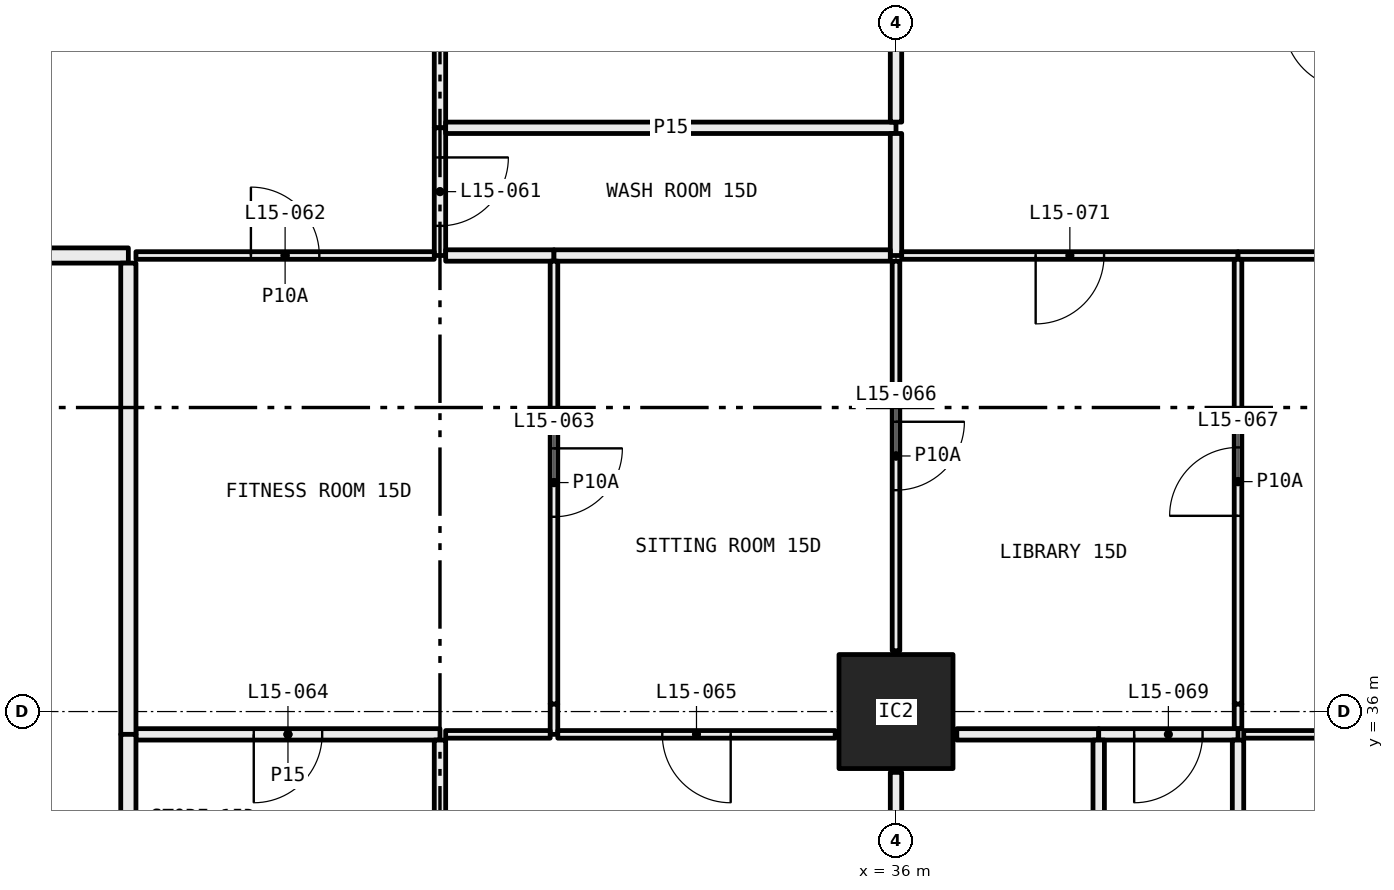
"""IFC4 building model, lengths in metres.
Left out: names, types, materials, properties, quantities, classifications, styles, units other than length and angle.
Written with IfcOpenShell. Run it as: python <this file> out.ifc"""

import sys

from ifc_helpers import new_model, si_unit, direction, frame, frame_2d, origin, origin_2d, place, context, subcontext, project, spatial, rectangle, hollow_rectangle, extrude, element, fill, save


model = new_model("IFC4")
c1 = context("Model", 3, precision=1e-05, world=origin(), true_north=direction((0.0, 1.0)))
c2 = subcontext(c1, "Body", "Model", "MODEL_VIEW")
j1 = project(units=[si_unit("LENGTHUNIT", "METRE"), si_unit("PLANEANGLEUNIT", "RADIAN")], contexts=[c1])
p1 = place(None, origin())
s1 = spatial("IfcSite", under=j1, at=p1, CompositionType="ELEMENT")
p2 = place(p1, origin())
s2 = spatial("IfcBuilding", under=s1, at=p2, CompositionType="ELEMENT")
p3 = place(p2, frame((0.0, 0.0, 64.5)))
s3 = spatial("IfcBuildingStorey", under=s2, at=p3, CompositionType="ELEMENT", Elevation=64.5)
p4 = place(p3, frame((36.0, 36.0, 0.0), z_axis=(0.0, 0.0, 1.0), x_axis=(1.0, 0.0, 0.0)))
e1 = element("IfcColumn", 1, at=p4, inside=s3, PredefinedType="COLUMN", context=c2, shape_type="SweptSolid", body=[
    extrude(hollow_rectangle(XDim=1.5, YDim=1.5, WallThickness=0.065, at=origin_2d()), origin(), (0.0, 0.0, 1.0), 3.05),
])
p5 = place(p3, frame((30.0, 43.68, 0.0), z_axis=(0.0, 0.0, 1.0), x_axis=(0.0, 1.0, 0.0)))
e2 = element("IfcWall", 2, at=p5, inside=s3, PredefinedType="PARTITIONING", context=c2, shape_type="SweptSolid", body=[
    extrude(rectangle(XDim=3.6, YDim=0.15, at=frame_2d((1.8, 0.0))), origin(), (0.0, 0.0, 1.0), 3.05),
])
p6 = place(p5, frame((1.35, 0.0, 0.0)))
e3 = element("IfcOpeningElement", 3, at=p6, cuts=e2, PredefinedType="OPENING", context=c2, shape_type="SweptSolid", body=[
    extrude(rectangle(XDim=0.9, YDim=2.1, at=frame_2d((0.45, 1.05))), frame((0.0, 0.085, 0.0), z_axis=(0.0, -1.0, 0.0), x_axis=(1.0, 0.0, 0.0)), (0.0, 0.0, 1.0), 0.17),
])
p7 = place(p3, frame((30.0, 42.0, 0.0), z_axis=(0.0, 0.0, 1.0), x_axis=(0.0, 1.0, 0.0)))
e4 = element("IfcWall", 4, at=p7, inside=s3, PredefinedType="PARTITIONING", context=c2, shape_type="SweptSolid", body=[
    extrude(rectangle(XDim=1.68, YDim=0.15, at=frame_2d((0.84, 0.0))), origin(), (0.0, 0.0, 1.0), 3.05),
])
p8 = place(p7, frame((0.39, 0.0, 0.0)))
e5 = element("IfcOpeningElement", 5, at=p8, cuts=e4, PredefinedType="OPENING", context=c2, shape_type="SweptSolid", body=[
    extrude(rectangle(XDim=0.9, YDim=2.1, at=frame_2d((0.45, 1.05))), frame((0.0, 0.085, 0.0), z_axis=(0.0, -1.0, 0.0), x_axis=(1.0, 0.0, 0.0)), (0.0, 0.0, 1.0), 0.17),
])
p9 = place(p3, frame((26.0, 42.0, 0.0), z_axis=(0.0, 0.0, 1.0), x_axis=(1.0, 0.0, 0.0)))
e6 = element("IfcWall", 6, at=p9, inside=s3, PredefinedType="PARTITIONING", context=c2, shape_type="SweptSolid", body=[
    extrude(rectangle(XDim=3.925, YDim=0.1, at=frame_2d((1.962, 0.0))), origin(), (0.0, 0.0, 1.0), 3.05),
])
p10 = place(p9, frame((1.512, 0.0, 0.0)))
e7 = element("IfcOpeningElement", 7, at=p10, cuts=e6, PredefinedType="OPENING", context=c2, shape_type="SweptSolid", body=[
    extrude(rectangle(XDim=0.9, YDim=2.1, at=frame_2d((0.45, 1.05))), frame((0.0, 0.06, 0.0), z_axis=(0.0, -1.0, 0.0), x_axis=(1.0, 0.0, 0.0)), (0.0, 0.0, 1.0), 0.12),
])
p11 = place(p3, frame((24.0, 42.0, 0.0), z_axis=(0.0, 0.0, 1.0), x_axis=(1.0, 0.0, 0.0)))
e8 = element("IfcWall", 8, at=p11, inside=s3, PredefinedType="PARTITIONING", context=c2, shape_type="SweptSolid", body=[
    extrude(rectangle(XDim=1.9, YDim=0.2, at=frame_2d((0.95, 0.0))), origin(), (0.0, 0.0, 1.0), 3.05),
])
p12 = place(p3, frame((30.075, 43.68, 0.0), z_axis=(0.0, 0.0, 1.0), x_axis=(1.0, 0.0, 0.0)))
e9 = element("IfcWall", 9, at=p12, inside=s3, PredefinedType="PARTITIONING", context=c2, shape_type="SweptSolid", body=[
    extrude(rectangle(XDim=5.925, YDim=0.15, at=frame_2d((2.962, 0.0))), origin(), (0.0, 0.0, 1.0), 2.45),
])
p13 = place(p3, frame((36.0, 43.755, 0.0), z_axis=(0.0, 0.0, 1.0), x_axis=(0.0, 1.0, 0.0)))
e10 = element("IfcWall", 10, at=p13, inside=s3, PredefinedType="PARTITIONING", context=c2, shape_type="SweptSolid", body=[
    extrude(rectangle(XDim=3.525, YDim=0.15, at=frame_2d((1.763, 0.0))), origin(), (0.0, 0.0, 1.0), 2.45),
])
p14 = place(p3, frame((36.0, 42.0, 0.0), z_axis=(0.0, 0.0, 1.0), x_axis=(0.0, 1.0, 0.0)))
e11 = element("IfcWall", 11, at=p14, inside=s3, PredefinedType="PARTITIONING", context=c2, shape_type="SweptSolid", body=[
    extrude(rectangle(XDim=1.605, YDim=0.15, at=frame_2d((0.802, 0.0))), origin(), (0.0, 0.0, 1.0), 2.45),
])
p15 = place(p3, frame((30.075, 42.0, 0.0), z_axis=(0.0, 0.0, 1.0), x_axis=(1.0, 0.0, 0.0)))
e12 = element("IfcWall", 12, at=p15, inside=s3, PredefinedType="PARTITIONING", context=c2, shape_type="SweptSolid", body=[
    extrude(rectangle(XDim=1.425, YDim=0.15, at=frame_2d((0.712, 0.0))), origin(), (0.0, 0.0, 1.0), 3.05),
])
p16 = place(p3, frame((31.5, 42.0, 0.0), z_axis=(0.0, 0.0, 1.0), x_axis=(1.0, 0.0, 0.0)))
e13 = element("IfcWall", 13, at=p16, inside=s3, PredefinedType="PARTITIONING", context=c2, shape_type="SweptSolid", body=[
    extrude(rectangle(XDim=4.425, YDim=0.15, at=frame_2d((2.212, 0.0))), origin(), (0.0, 0.0, 1.0), 2.45),
])
p17 = place(p3, frame((36.075, 42.0, 0.0), z_axis=(0.0, 0.0, 1.0), x_axis=(1.0, 0.0, 0.0)))
e14 = element("IfcWall", 14, at=p17, inside=s3, PredefinedType="PARTITIONING", context=c2, shape_type="SweptSolid", body=[
    extrude(rectangle(XDim=4.425, YDim=0.1, at=frame_2d((2.212, 0.0))), origin(), (0.0, 0.0, 1.0), 2.45),
])
p18 = place(p17, frame((1.762, 0.0, 0.0)))
e15 = element("IfcOpeningElement", 15, at=p18, cuts=e14, PredefinedType="OPENING", context=c2, shape_type="SweptSolid", body=[
    extrude(rectangle(XDim=0.9, YDim=2.1, at=frame_2d((0.45, 1.05))), frame((0.0, 0.06, 0.0), z_axis=(0.0, -1.0, 0.0), x_axis=(1.0, 0.0, 0.0)), (0.0, 0.0, 1.0), 0.12),
])
p19 = place(p3, frame((40.5, 42.0, 0.0), z_axis=(0.0, 0.0, 1.0), x_axis=(1.0, 0.0, 0.0)))
e16 = element("IfcWall", 16, at=p19, inside=s3, PredefinedType="PARTITIONING", context=c2, shape_type="SweptSolid", body=[
    extrude(rectangle(XDim=1.45, YDim=0.1, at=frame_2d((0.725, 0.0))), origin(), (0.0, 0.0, 1.0), 3.05),
])
p20 = place(p3, frame((31.5, 35.7, 0.0), z_axis=(0.0, 0.0, 1.0), x_axis=(0.0, 1.0, 0.0)))
e17 = element("IfcWall", 17, at=p20, inside=s3, PredefinedType="PARTITIONING", context=c2, shape_type="SweptSolid", body=[
    extrude(rectangle(XDim=0.4, YDim=0.1, at=frame_2d((0.2, 0.0))), origin(), (0.0, 0.0, 1.0), 2.45),
])
p21 = place(p3, frame((31.5, 36.1, 0.0), z_axis=(0.0, 0.0, 1.0), x_axis=(0.0, 1.0, 0.0)))
e18 = element("IfcWall", 18, at=p21, inside=s3, PredefinedType="PARTITIONING", context=c2, shape_type="SweptSolid", body=[
    extrude(rectangle(XDim=5.825, YDim=0.1, at=frame_2d((2.913, 0.0))), origin(), (0.0, 0.0, 1.0), 3.05),
])
p22 = place(p21, frame((2.462, 0.0, 0.0)))
e19 = element("IfcOpeningElement", 19, at=p22, cuts=e18, PredefinedType="OPENING", context=c2, shape_type="SweptSolid", body=[
    extrude(rectangle(XDim=0.9, YDim=2.1, at=frame_2d((0.45, 1.05))), frame((0.0, 0.06, 0.0), z_axis=(0.0, -1.0, 0.0), x_axis=(1.0, 0.0, 0.0)), (0.0, 0.0, 1.0), 0.12),
])
p23 = place(p3, frame((26.0, 35.7, 0.0), z_axis=(0.0, 0.0, 1.0), x_axis=(1.0, 0.0, 0.0)))
e20 = element("IfcWall", 20, at=p23, inside=s3, PredefinedType="PARTITIONING", context=c2, shape_type="SweptSolid", body=[
    extrude(rectangle(XDim=4.0, YDim=0.15, at=frame_2d((2.0, 0.0))), origin(), (0.0, 0.0, 1.0), 3.05),
])
p24 = place(p23, frame((1.55, 0.0, 0.0)))
e21 = element("IfcOpeningElement", 21, at=p24, cuts=e20, PredefinedType="OPENING", context=c2, shape_type="SweptSolid", body=[
    extrude(rectangle(XDim=0.9, YDim=2.1, at=frame_2d((0.45, 1.05))), frame((0.0, 0.085, 0.0), z_axis=(0.0, -1.0, 0.0), x_axis=(1.0, 0.0, 0.0)), (0.0, 0.0, 1.0), 0.17),
])
p25 = place(p3, frame((30.075, 35.7, 0.0), z_axis=(0.0, 0.0, 1.0), x_axis=(1.0, 0.0, 0.0)))
e22 = element("IfcWall", 22, at=p25, inside=s3, PredefinedType="PARTITIONING", context=c2, shape_type="SweptSolid", body=[
    extrude(rectangle(XDim=1.375, YDim=0.1, at=frame_2d((0.688, 0.0))), origin(), (0.0, 0.0, 1.0), 3.05),
])
p26 = place(p3, frame((25.9, 41.9, 0.0), z_axis=(0.0, 0.0, 1.0), x_axis=(0.0, -1.0, 0.0)))
e23 = element("IfcWall", 23, at=p26, inside=s3, PredefinedType="PARTITIONING", context=c2, shape_type="SweptSolid", body=[
    extrude(rectangle(XDim=6.2, YDim=0.2, at=frame_2d((3.1, 0.0))), origin(), (0.0, 0.0, 1.0), 2.45),
])
p27 = place(p3, frame((31.55, 35.7, 0.0), z_axis=(0.0, 0.0, 1.0), x_axis=(1.0, 0.0, 0.0)))
e24 = element("IfcWall", 24, at=p27, inside=s3, PredefinedType="PARTITIONING", context=c2, shape_type="SweptSolid", body=[
    extrude(rectangle(XDim=3.65, YDim=0.1, at=frame_2d((1.825, 0.0))), origin(), (0.0, 0.0, 1.0), 3.05),
])
p28 = place(p27, frame((1.375, 0.0, 0.0)))
e25 = element("IfcOpeningElement", 25, at=p28, cuts=e24, PredefinedType="OPENING", context=c2, shape_type="SweptSolid", body=[
    extrude(rectangle(XDim=0.9, YDim=2.1, at=frame_2d((0.45, 1.05))), frame((0.0, 0.06, 0.0), z_axis=(0.0, -1.0, 0.0), x_axis=(1.0, 0.0, 0.0)), (0.0, 0.0, 1.0), 0.12),
])
p29 = place(p3, frame((36.0, 36.8, 0.0), z_axis=(0.0, 0.0, 1.0), x_axis=(0.0, 1.0, 0.0)))
e26 = element("IfcWall", 26, at=p29, inside=s3, PredefinedType="PARTITIONING", context=c2, shape_type="SweptSolid", body=[
    extrude(rectangle(XDim=5.125, YDim=0.1, at=frame_2d((2.562, 0.0))), origin(), (0.0, 0.0, 1.0), 2.45),
])
p30 = place(p29, frame((2.113, 0.0, 0.0)))
e27 = element("IfcOpeningElement", 27, at=p30, cuts=e26, PredefinedType="OPENING", context=c2, shape_type="SweptSolid", body=[
    extrude(rectangle(XDim=0.9, YDim=2.1, at=frame_2d((0.45, 1.05))), frame((0.0, 0.06, 0.0), z_axis=(0.0, -1.0, 0.0), x_axis=(1.0, 0.0, 0.0)), (0.0, 0.0, 1.0), 0.12),
])
p31 = place(p3, frame((30.0, 33.675, 0.0), z_axis=(0.0, 0.0, 1.0), x_axis=(0.0, 1.0, 0.0)))
e28 = element("IfcWall", 28, at=p31, inside=s3, PredefinedType="PARTITIONING", context=c2, shape_type="SweptSolid", body=[
    extrude(rectangle(XDim=1.95, YDim=0.15, at=frame_2d((0.975, 0.0))), origin(), (0.0, 0.0, 1.0), 3.05),
])
p32 = place(p3, frame((25.9, 35.7, 0.0), z_axis=(0.0, 0.0, 1.0), x_axis=(0.0, -1.0, 0.0)))
e29 = element("IfcWall", 29, at=p32, inside=s3, PredefinedType="PARTITIONING", context=c2, shape_type="SweptSolid", body=[
    extrude(rectangle(XDim=2.1, YDim=0.2, at=frame_2d((1.05, 0.0))), origin(), (0.0, 0.0, 1.0), 3.05),
])
p33 = place(p3, frame((36.0, 31.3, 0.0), z_axis=(0.0, 0.0, 1.0), x_axis=(0.0, 1.0, 0.0)))
e30 = element("IfcWall", 30, at=p33, inside=s3, PredefinedType="PARTITIONING", context=c2, shape_type="SweptSolid", body=[
    extrude(rectangle(XDim=3.9, YDim=0.15, at=frame_2d((1.95, 0.0))), origin(), (0.0, 0.0, 1.0), 2.45),
])
p34 = place(p33, frame((1.5, 0.0, 0.0)))
e31 = element("IfcOpeningElement", 31, at=p34, cuts=e30, PredefinedType="OPENING", context=c2, shape_type="SweptSolid", body=[
    extrude(rectangle(XDim=0.9, YDim=2.1, at=frame_2d((0.45, 1.05))), frame((0.0, 0.085, 0.0), z_axis=(0.0, -1.0, 0.0), x_axis=(1.0, 0.0, 0.0)), (0.0, 0.0, 1.0), 0.17),
])
p35 = place(p3, frame((40.5, 35.775, 0.0), z_axis=(0.0, 0.0, 1.0), x_axis=(0.0, 1.0, 0.0)))
e32 = element("IfcWall", 32, at=p35, inside=s3, PredefinedType="PARTITIONING", context=c2, shape_type="SweptSolid", body=[
    extrude(rectangle(XDim=0.325, YDim=0.1, at=frame_2d((0.163, 0.0))), origin(), (0.0, 0.0, 1.0), 2.45),
])
p36 = place(p3, frame((40.5, 36.1, 0.0), z_axis=(0.0, 0.0, 1.0), x_axis=(0.0, 1.0, 0.0)))
e33 = element("IfcWall", 33, at=p36, inside=s3, PredefinedType="PARTITIONING", context=c2, shape_type="SweptSolid", body=[
    extrude(rectangle(XDim=5.85, YDim=0.1, at=frame_2d((2.925, 0.0))), origin(), (0.0, 0.0, 1.0), 3.05),
])
p37 = place(p36, frame((2.475, 0.0, 0.0)))
e34 = element("IfcOpeningElement", 34, at=p37, cuts=e33, PredefinedType="OPENING", context=c2, shape_type="SweptSolid", body=[
    extrude(rectangle(XDim=0.9, YDim=2.1, at=frame_2d((0.45, 1.05))), frame((0.0, 0.06, 0.0), z_axis=(0.0, -1.0, 0.0), x_axis=(1.0, 0.0, 0.0)), (0.0, 0.0, 1.0), 0.12),
])
p38 = place(p3, frame((36.8, 35.7, 0.0), z_axis=(0.0, 0.0, 1.0), x_axis=(1.0, 0.0, 0.0)))
e35 = element("IfcWall", 35, at=p38, inside=s3, PredefinedType="PARTITIONING", context=c2, shape_type="SweptSolid", body=[
    extrude(rectangle(XDim=1.867, YDim=0.15, at=frame_2d((0.934, 0.0))), origin(), (0.0, 0.0, 1.0), 3.05),
])
p39 = place(p3, frame((38.667, 35.7, 0.0), z_axis=(0.0, 0.0, 1.0), x_axis=(1.0, 0.0, 0.0)))
e36 = element("IfcWall", 36, at=p39, inside=s3, PredefinedType="PARTITIONING", context=c2, shape_type="SweptSolid", body=[
    extrude(rectangle(XDim=1.833, YDim=0.15, at=frame_2d((0.917, 0.0))), origin(), (0.0, 0.0, 1.0), 3.05),
])
p40 = place(p39, frame((0.467, 0.0, 0.0)))
e37 = element("IfcOpeningElement", 37, at=p40, cuts=e36, PredefinedType="OPENING", context=c2, shape_type="SweptSolid", body=[
    extrude(rectangle(XDim=0.9, YDim=2.1, at=frame_2d((0.45, 1.05))), frame((0.0, 0.085, 0.0), z_axis=(0.0, -1.0, 0.0), x_axis=(1.0, 0.0, 0.0)), (0.0, 0.0, 1.0), 0.17),
])
p41 = place(p3, frame((40.575, 35.7, 0.0), z_axis=(0.0, 0.0, 1.0), x_axis=(1.0, 0.0, 0.0)))
e38 = element("IfcWall", 38, at=p41, inside=s3, PredefinedType="PARTITIONING", context=c2, shape_type="SweptSolid", body=[
    extrude(rectangle(XDim=5.425, YDim=0.1, at=frame_2d((2.712, 0.0))), origin(), (0.0, 0.0, 1.0), 3.05),
])
p42 = place(p41, frame((2.262, 0.0, 0.0)))
e39 = element("IfcOpeningElement", 39, at=p42, cuts=e38, PredefinedType="OPENING", context=c2, shape_type="SweptSolid", body=[
    extrude(rectangle(XDim=0.9, YDim=2.1, at=frame_2d((0.45, 1.05))), frame((0.0, 0.06, 0.0), z_axis=(0.0, -1.0, 0.0), x_axis=(1.0, 0.0, 0.0)), (0.0, 0.0, 1.0), 0.12),
])
for number, where, z_axis, x_axis in (
    (40, (38.667, 31.3, 0.0), (0.0, 0.0, 1.0), (0.0, 1.0, 0.0)),
    (41, (40.5, 31.3, 0.0), (0.0, 0.0, 1.0), (0.0, 1.0, 0.0)),
):
    element("IfcWall", number, at=place(p3, frame(where, z_axis=z_axis, x_axis=x_axis)), inside=s3, PredefinedType="PARTITIONING", context=c2, shape_type="SweptSolid", body=[
        extrude(rectangle(XDim=4.325, YDim=0.15, at=frame_2d((2.163, 0.0))), origin(), (0.0, 0.0, 1.0), 3.05),
    ])
p43 = place(p8, frame((0.9, 0.0, 0.0), x_axis=(-1.0, 0.0, 0.0)))
e42 = element("IfcDoor", 42, at=p43, inside=s3, OperationType="SINGLE_SWING_RIGHT", PredefinedType="DOOR", context=c2, shape_type="SweptSolid", body=[
    extrude(rectangle(XDim=0.9, YDim=2.1, at=frame_2d((0.45, 1.05))), frame((0.0, 0.025, 0.0), z_axis=(0.0, -1.0, 0.0), x_axis=(1.0, 0.0, 0.0)), (0.0, 0.0, 1.0), 0.05),
])
fill(e5, e42)
p44 = place(p10, origin())
e43 = element("IfcDoor", 43, at=p44, inside=s3, OperationType="SINGLE_SWING_RIGHT", PredefinedType="DOOR", context=c2, shape_type="SweptSolid", body=[
    extrude(rectangle(XDim=0.9, YDim=2.1, at=frame_2d((0.45, 1.05))), frame((0.0, 0.025, 0.0), z_axis=(0.0, -1.0, 0.0), x_axis=(1.0, 0.0, 0.0)), (0.0, 0.0, 1.0), 0.05),
])
fill(e7, e43)
p45 = place(p22, frame((0.9, 0.0, 0.0), x_axis=(-1.0, 0.0, 0.0)))
e44 = element("IfcDoor", 44, at=p45, inside=s3, OperationType="SINGLE_SWING_RIGHT", PredefinedType="DOOR", context=c2, shape_type="SweptSolid", body=[
    extrude(rectangle(XDim=0.9, YDim=2.1, at=frame_2d((0.45, 1.05))), frame((0.0, 0.025, 0.0), z_axis=(0.0, -1.0, 0.0), x_axis=(1.0, 0.0, 0.0)), (0.0, 0.0, 1.0), 0.05),
])
fill(e19, e44)
p46 = place(p24, frame((0.9, 0.0, 0.0), x_axis=(-1.0, 0.0, 0.0)))
e45 = element("IfcDoor", 45, at=p46, inside=s3, OperationType="SINGLE_SWING_LEFT", PredefinedType="DOOR", context=c2, shape_type="SweptSolid", body=[
    extrude(rectangle(XDim=0.9, YDim=2.1, at=frame_2d((0.45, 1.05))), frame((0.0, 0.025, 0.0), z_axis=(0.0, -1.0, 0.0), x_axis=(1.0, 0.0, 0.0)), (0.0, 0.0, 1.0), 0.05),
])
fill(e21, e45)
p47 = place(p28, frame((0.9, 0.0, 0.0), x_axis=(-1.0, 0.0, 0.0)))
e46 = element("IfcDoor", 46, at=p47, inside=s3, OperationType="SINGLE_SWING_RIGHT", PredefinedType="DOOR", context=c2, shape_type="SweptSolid", body=[
    extrude(rectangle(XDim=0.9, YDim=2.1, at=frame_2d((0.45, 1.05))), frame((0.0, 0.025, 0.0), z_axis=(0.0, -1.0, 0.0), x_axis=(1.0, 0.0, 0.0)), (0.0, 0.0, 1.0), 0.05),
])
fill(e25, e46)
p48 = place(p30, frame((0.9, 0.0, 0.0), x_axis=(-1.0, 0.0, 0.0)))
e47 = element("IfcDoor", 47, at=p48, inside=s3, OperationType="SINGLE_SWING_RIGHT", PredefinedType="DOOR", context=c2, shape_type="SweptSolid", body=[
    extrude(rectangle(XDim=0.9, YDim=2.1, at=frame_2d((0.45, 1.05))), frame((0.0, 0.025, 0.0), z_axis=(0.0, -1.0, 0.0), x_axis=(1.0, 0.0, 0.0)), (0.0, 0.0, 1.0), 0.05),
])
fill(e27, e47)
p49 = place(p37, origin())
e48 = element("IfcDoor", 48, at=p49, inside=s3, OperationType="SINGLE_SWING_RIGHT", PredefinedType="DOOR", context=c2, shape_type="SweptSolid", body=[
    extrude(rectangle(XDim=0.9, YDim=2.1, at=frame_2d((0.45, 1.05))), frame((0.0, 0.025, 0.0), z_axis=(0.0, -1.0, 0.0), x_axis=(1.0, 0.0, 0.0)), (0.0, 0.0, 1.0), 0.05),
])
fill(e34, e48)
p50 = place(p40, frame((0.9, 0.0, 0.0), x_axis=(-1.0, 0.0, 0.0)))
e49 = element("IfcDoor", 49, at=p50, inside=s3, OperationType="SINGLE_SWING_LEFT", PredefinedType="DOOR", context=c2, shape_type="SweptSolid", body=[
    extrude(rectangle(XDim=0.9, YDim=2.1, at=frame_2d((0.45, 1.05))), frame((0.0, 0.025, 0.0), z_axis=(0.0, -1.0, 0.0), x_axis=(1.0, 0.0, 0.0)), (0.0, 0.0, 1.0), 0.05),
])
fill(e37, e49)
p51 = place(p18, frame((0.9, 0.0, 0.0), x_axis=(-1.0, 0.0, 0.0)))
e50 = element("IfcDoor", 50, at=p51, inside=s3, OperationType="SINGLE_SWING_LEFT", PredefinedType="DOOR", context=c2, shape_type="SweptSolid", body=[
    extrude(rectangle(XDim=0.9, YDim=2.1, at=frame_2d((0.45, 1.05))), frame((0.0, 0.025, 0.0), z_axis=(0.0, -1.0, 0.0), x_axis=(1.0, 0.0, 0.0)), (0.0, 0.0, 1.0), 0.05),
])
fill(e15, e50)
save(model, sys.argv[1])
